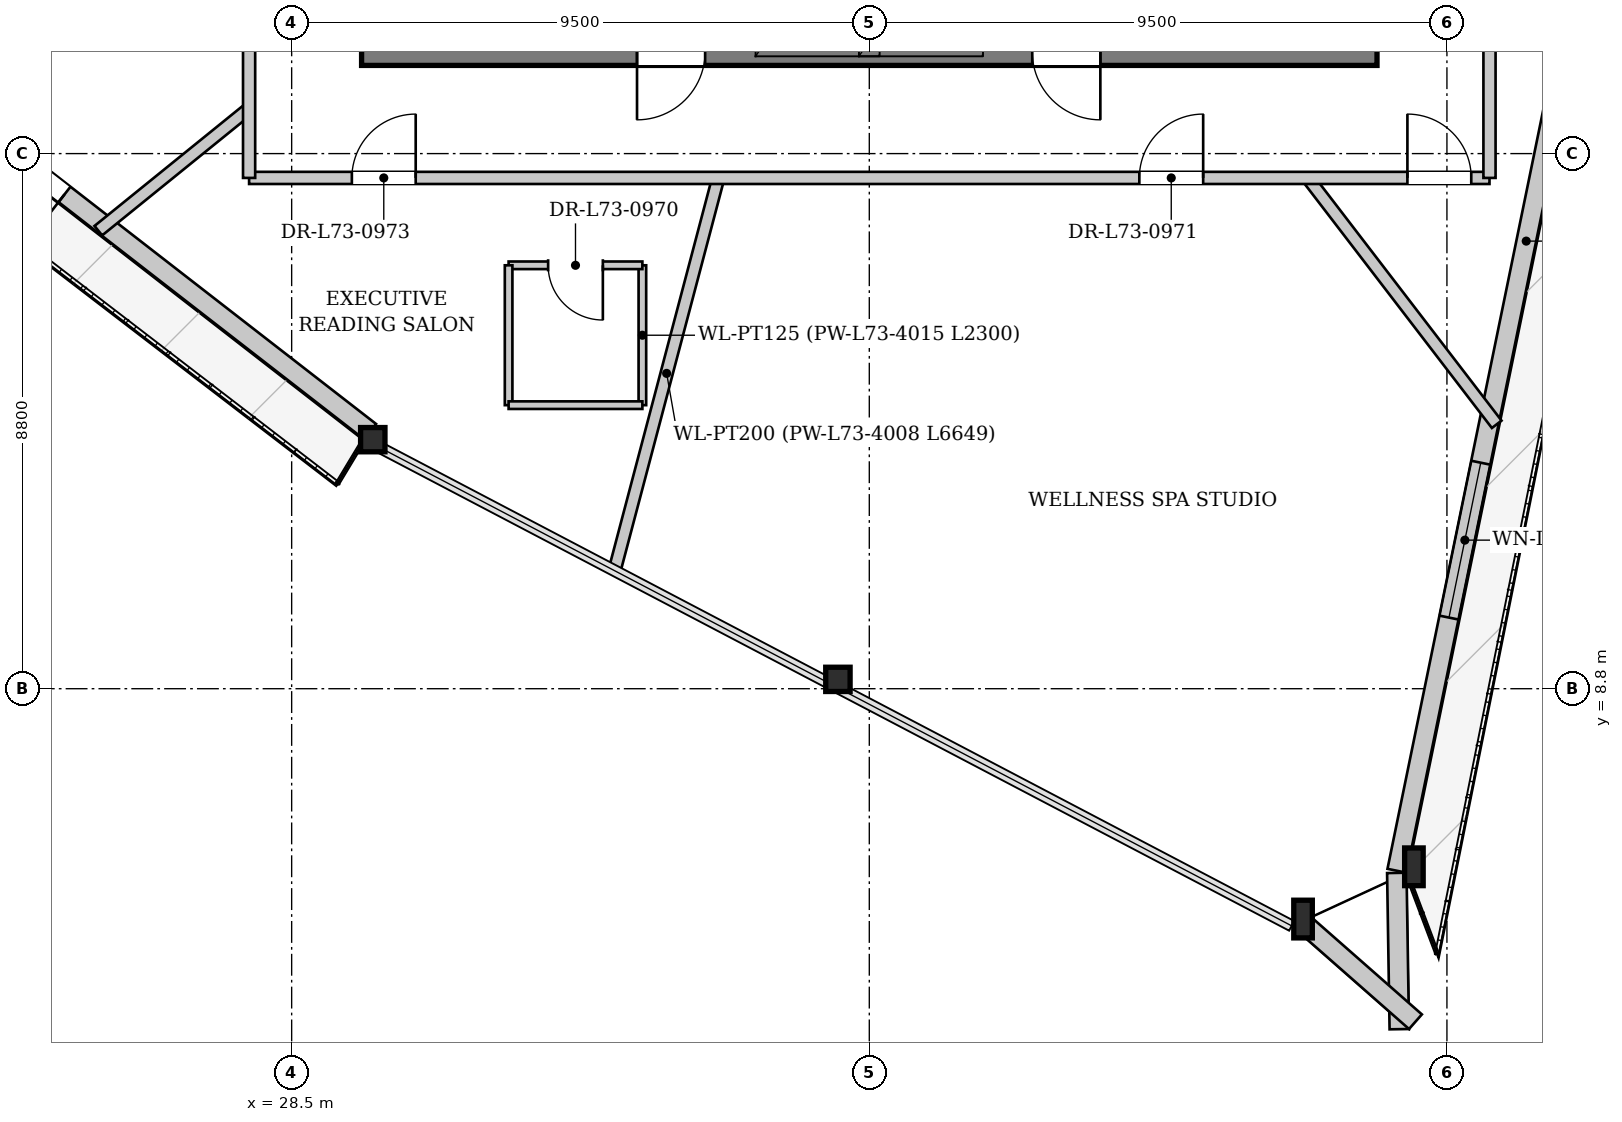
"""IFC4 building model, lengths in metres.
Left out: names, types, materials, properties, quantities, classifications, styles, units other than length and angle.
Written with IfcOpenShell. Run it as: python <this file> out.ifc"""

import sys

from ifc_helpers import new_model, si_unit, direction, frame, frame_2d, origin, origin_2d, place, context, subcontext, project, spatial, rectangle, i_section, extrude, source, transform, mapped, element, fill, save


model = new_model("IFC4")
c1 = context("Model", 3, precision=1e-05, world=origin(), true_north=direction((0.0, 1.0)))
c2 = subcontext(c1, "Body", "Model", "MODEL_VIEW")
j1 = project(units=[si_unit("LENGTHUNIT", "METRE"), si_unit("PLANEANGLEUNIT", "RADIAN")], contexts=[c1])
p1 = place(None, origin())
s1 = spatial("IfcSite", under=j1, at=p1, CompositionType="ELEMENT")
p2 = place(p1, origin())
s2 = spatial("IfcBuilding", under=s1, at=p2, CompositionType="ELEMENT")
p3 = place(p2, frame((0.0, 0.0, 274.1)))
s3 = spatial("IfcBuildingStorey", under=s2, at=p3, CompositionType="ELEMENT", Elevation=274.1)
m1 = source(origin(), c2, "Body", "SweptSolid", [
    extrude(i_section(OverallWidth=0.401, OverallDepth=0.399, WebThickness=0.022, FlangeThickness=0.034, at=origin_2d()), origin(), (0.0, 0.0, 1.0), 3.447),
])
p4 = place(p3, frame((29.692, 12.902, 0.0), z_axis=(0.082663911936, -0.003541727161, 0.996571188542), x_axis=(0.042805630631, 0.999083418933, 0.0)))
e1 = element("IfcColumn", 1, at=p4, inside=s3, PredefinedType="COLUMN", context=c2, shape_type="MappedRepresentation", body=[
    mapped(m1, transform((0.0, 0.0, 0.0), x_axis=(1.0, 0.0, 0.0), y_axis=(0.0, 1.0, 0.0), z_axis=(0.0, 0.0, 1.0), scale=1.0)),
])
m2 = source(origin(), c2, "Body", "SweptSolid", [
    extrude(i_section(OverallWidth=0.401, OverallDepth=0.399, WebThickness=0.022, FlangeThickness=0.034, at=origin_2d()), origin(), (0.0, 0.0, 1.0), 3.452),
])
p5 = place(p3, frame((37.319, 8.901, 0.0), z_axis=(0.095472332547, 0.030551146415, 0.994963145634), x_axis=(-0.304775727104, 0.952424147199, 0.0)))
e2 = element("IfcColumn", 2, at=p5, inside=s3, PredefinedType="COLUMN", context=c2, shape_type="MappedRepresentation", body=[
    mapped(m2, transform((0.0, 0.0, 0.0), x_axis=(1.0, 0.0, 0.0), y_axis=(0.0, 1.0, 0.0), z_axis=(0.0, 0.0, 1.0), scale=1.0)),
])
m3 = source(origin(), c2, "Body", "SweptSolid", [
    extrude(i_section(OverallWidth=0.305, OverallDepth=0.62, WebThickness=0.021, FlangeThickness=0.04, at=origin_2d()), origin(), (0.0, 0.0, 1.0), 3.462),
])
p6 = place(p3, frame((44.946, 4.9, 0.0), z_axis=(0.108166795995, 0.064378282101, 0.992046057922), x_axis=(-0.511444466069, 0.859316331817, 0.0)))
e3 = element("IfcColumn", 3, at=p6, inside=s3, PredefinedType="COLUMN", context=c2, shape_type="MappedRepresentation", body=[
    mapped(m3, transform((0.0, 0.0, 0.0), x_axis=(1.0, 0.0, 0.0), y_axis=(0.0, 1.0, 0.0), z_axis=(0.0, 0.0, 1.0), scale=1.0)),
])
m4 = source(origin(), c2, "Body", "SweptSolid", [
    extrude(i_section(OverallWidth=0.305, OverallDepth=0.62, WebThickness=0.021, FlangeThickness=0.04, at=origin_2d()), origin(), (0.0, 0.0, 1.0), 3.449),
])
p7 = place(p3, frame((46.836, 5.773, 0.0), z_axis=(0.070221852899, 0.05670131469, 0.99591859722), x_axis=(-0.628227565106, 0.778029643677, 0.0)))
e4 = element("IfcColumn", 4, at=p7, inside=s3, PredefinedType="COLUMN", context=c2, shape_type="MappedRepresentation", body=[
    mapped(m4, transform((0.0, 0.0, 0.0), x_axis=(1.0, 0.0, 0.0), y_axis=(0.0, 1.0, 0.0), z_axis=(0.0, 0.0, 1.0), scale=1.0)),
])
p8 = place(p3, frame((51.126, 27.473, 0.0), z_axis=(0.0, 0.0, 1.0), x_axis=(-0.201040285464, -0.979582974342, 0.0)))
e5 = element("IfcWall", 5, at=p8, inside=s3, PredefinedType="SOLIDWALL", context=c2, shape_type="SweptSolid", body=[
    extrude(rectangle(XDim=22.119, YDim=0.32, at=frame_2d((11.06, 0.0))), origin(), (0.0, 0.0, 1.0), 2.812),
])
p9 = place(p8, frame((6.328, 0.0, 0.0)))
e6 = element("IfcOpeningElement", 6, at=p9, cuts=e5, PredefinedType="OPENING", context=c2, shape_type="SweptSolid", body=[
    extrude(rectangle(XDim=1.5, YDim=2.3, at=frame_2d((0.75, 1.15))), frame((0.0, 0.17, 0.0), z_axis=(0.0, -1.0, 0.0), x_axis=(1.0, 0.0, 0.0)), (0.0, 0.0, 1.0), 0.34),
])
p10 = place(p8, frame((15.268, 0.0, 0.342)))
e7 = element("IfcOpeningElement", 7, at=p10, cuts=e5, PredefinedType="OPENING", context=c2, shape_type="SweptSolid", body=[
    extrude(rectangle(XDim=2.6, YDim=2.35, at=frame_2d((1.3, 1.175))), frame((0.0, 0.17, 0.0), z_axis=(0.0, -1.0, 0.0), x_axis=(1.0, 0.0, 0.0)), (0.0, 0.0, 1.0), 0.34),
])
for number, where, z_axis, x_axis in (
    (8, (46.676, 5.771, 0.0), (0.0, 0.0, 1.0), (0.016, -1.0, 0.0)),
    (9, (46.982, 3.324, 0.0), (0.0, 0.0, 1.0), (-0.751, 0.66, 0.0)),
):
    element("IfcWall", number, at=place(p3, frame(where, z_axis=z_axis, x_axis=x_axis)), inside=s3, PredefinedType="SOLIDWALL", context=c2, shape_type="SweptSolid", body=[
        extrude(rectangle(XDim=2.57, YDim=0.32, at=frame_2d((1.285, 0.0))), origin(), (0.0, 0.0, 1.0), 2.812),
    ])
p11 = place(p3, frame((29.79, 13.028, 0.0), z_axis=(0.0, 0.0, 1.0), x_axis=(-0.78993873284, 0.613185778014, 0.0)))
e10 = element("IfcWall", 10, at=p11, inside=s3, PredefinedType="SOLIDWALL", context=c2, shape_type="SweptSolid", body=[
    extrude(rectangle(XDim=17.226, YDim=0.32, at=frame_2d((8.613, 0.0))), origin(), (0.0, 0.0, 1.0), 2.812),
])
p12 = place(p11, frame((6.362, 0.0, 0.0)))
e11 = element("IfcOpeningElement", 11, at=p12, cuts=e10, PredefinedType="OPENING", context=c2, shape_type="SweptSolid", body=[
    extrude(rectangle(XDim=1.5, YDim=2.3, at=frame_2d((0.75, 1.15))), frame((0.0, 0.17, 0.0), z_axis=(0.0, -1.0, 0.0), x_axis=(1.0, 0.0, 0.0)), (0.0, 0.0, 1.0), 0.34),
])
p13 = place(p11, frame((11.447, 0.0, 0.342)))
e12 = element("IfcOpeningElement", 12, at=p13, cuts=e10, PredefinedType="OPENING", context=c2, shape_type="SweptSolid", body=[
    extrude(rectangle(XDim=2.6, YDim=2.35, at=frame_2d((1.3, 1.175))), frame((0.0, 0.17, 0.0), z_axis=(0.0, -1.0, 0.0), x_axis=(1.0, 0.0, 0.0)), (0.0, 0.0, 1.0), 0.34),
])
p14 = place(p3, frame((46.35, 19.275, 0.0), z_axis=(0.0, 0.0, 1.0), x_axis=(-1.0, 0.0, 0.0)))
e13 = element("IfcWall", 13, at=p14, inside=s3, PredefinedType="SHEAR", context=c2, shape_type="SweptSolid", body=[
    extrude(rectangle(XDim=16.7, YDim=0.45, at=frame_2d((8.35, 0.0))), origin(), (0.0, 0.0, 1.0), 3.32),
])
p15 = place(p14, frame((4.55, 0.0, 0.0)))
e14 = element("IfcOpeningElement", 14, at=p15, cuts=e13, PredefinedType="OPENING", context=c2, shape_type="SweptSolid", body=[
    extrude(rectangle(XDim=1.12, YDim=2.25, at=frame_2d((0.56, 1.125))), frame((0.0, 0.235, 0.0), z_axis=(0.0, -1.0, 0.0), x_axis=(1.0, 0.0, 0.0)), (0.0, 0.0, 1.0), 0.47),
])
p16 = place(p14, frame((11.05, 0.0, 0.0)))
e15 = element("IfcOpeningElement", 15, at=p16, cuts=e13, PredefinedType="OPENING", context=c2, shape_type="SweptSolid", body=[
    extrude(rectangle(XDim=1.12, YDim=2.25, at=frame_2d((0.56, 1.125))), frame((0.0, 0.235, 0.0), z_axis=(0.0, -1.0, 0.0), x_axis=(1.0, 0.0, 0.0)), (0.0, 0.0, 1.0), 0.47),
])
p17 = place(p3, frame((35.516, 17.2, 0.0), z_axis=(0.0, 0.0, 1.0), x_axis=(-0.255438396105, -0.966825333654, 0.0)))
e16 = element("IfcWall", 16, at=p17, inside=s3, PredefinedType="PARTITIONING", context=c2, shape_type="SweptSolid", body=[
    extrude(rectangle(XDim=6.649, YDim=0.2, at=frame_2d((3.325, 0.0))), origin(), (0.0, 0.0, 1.0), 3.32),
])
p18 = place(p3, frame((45.21, 17.2, 0.0), z_axis=(0.0, 0.0, 1.0), x_axis=(0.608631250034, -0.793453213165, 0.0)))
e17 = element("IfcWall", 17, at=p18, inside=s3, PredefinedType="PARTITIONING", context=c2, shape_type="SweptSolid", body=[
    extrude(rectangle(XDim=5.107, YDim=0.2, at=frame_2d((2.553, 0.0))), origin(), (0.0, 0.0, 1.0), 3.32),
])
p19 = place(p3, frame((27.8, 18.341, 0.0), z_axis=(0.0, 0.0, 1.0), x_axis=(-0.777145079271, -0.629321480457, 0.0)))
e18 = element("IfcWall", 18, at=p19, inside=s3, PredefinedType="PARTITIONING", context=c2, shape_type="SweptSolid", body=[
    extrude(rectangle(XDim=3.191, YDim=0.2, at=frame_2d((1.595, 0.0))), origin(), (0.0, 0.0, 1.0), 3.32),
])
p20 = place(p3, frame((34.268, 13.463, 0.0), z_axis=(0.0, 0.0, 1.0), x_axis=(0.0, 1.0, 0.0)))
e19 = element("IfcWall", 19, at=p20, inside=s3, PredefinedType="PARTITIONING", context=c2, shape_type="SweptSolid", body=[
    extrude(rectangle(XDim=2.3, YDim=0.125, at=frame_2d((1.15, 0.0))), origin(), (0.0, 0.0, 1.0), 3.32),
])
p21 = place(p3, frame((34.268, 15.763, 0.0), z_axis=(0.0, 0.0, 1.0), x_axis=(-1.0, 0.0, 0.0)))
e20 = element("IfcWall", 20, at=p21, inside=s3, PredefinedType="PARTITIONING", context=c2, shape_type="SweptSolid", body=[
    extrude(rectangle(XDim=2.2, YDim=0.125, at=frame_2d((1.1, 0.0))), origin(), (0.0, 0.0, 1.0), 3.32),
])
p22 = place(p21, frame((0.65, 0.0, 0.0)))
e21 = element("IfcOpeningElement", 21, at=p22, cuts=e20, PredefinedType="OPENING", context=c2, shape_type="SweptSolid", body=[
    extrude(rectangle(XDim=0.9, YDim=2.1, at=frame_2d((0.45, 1.05))), frame((0.0, 0.073, 0.0), z_axis=(0.0, -1.0, 0.0), x_axis=(1.0, 0.0, 0.0)), (0.0, 0.0, 1.0), 0.145),
])
p23 = place(p3, frame((32.068, 15.763, 0.0), z_axis=(0.0, 0.0, 1.0), x_axis=(0.0, -1.0, 0.0)))
e22 = element("IfcWall", 22, at=p23, inside=s3, PredefinedType="PARTITIONING", context=c2, shape_type="SweptSolid", body=[
    extrude(rectangle(XDim=2.3, YDim=0.125, at=frame_2d((1.15, 0.0))), origin(), (0.0, 0.0, 1.0), 3.32),
])
p24 = place(p3, frame((32.068, 13.463, 0.0), z_axis=(0.0, 0.0, 1.0), x_axis=(1.0, 0.0, 0.0)))
e23 = element("IfcWall", 23, at=p24, inside=s3, PredefinedType="PARTITIONING", context=c2, shape_type="SweptSolid", body=[
    extrude(rectangle(XDim=2.2, YDim=0.125, at=frame_2d((1.1, 0.0))), origin(), (0.0, 0.0, 1.0), 3.32),
])
p25 = place(p3, frame((27.8, 17.2, 0.0), z_axis=(0.0, 0.0, 1.0), x_axis=(1.0, 0.0, 0.0)))
e24 = element("IfcWall", 24, at=p25, inside=s3, PredefinedType="PARTITIONING", context=c2, shape_type="SweptSolid", body=[
    extrude(rectangle(XDim=20.4, YDim=0.2, at=frame_2d((10.2, 0.0))), origin(), (0.0, 0.0, 1.0), 3.32),
])
p26 = place(p25, frame((14.641, 0.0, 0.0)))
e25 = element("IfcOpeningElement", 25, at=p26, cuts=e24, PredefinedType="OPENING", context=c2, shape_type="SweptSolid", body=[
    extrude(rectangle(XDim=1.05, YDim=2.2, at=frame_2d((0.525, 1.1))), frame((0.0, 0.11, 0.0), z_axis=(0.0, -1.0, 0.0), x_axis=(1.0, 0.0, 0.0)), (0.0, 0.0, 1.0), 0.22),
])
p27 = place(p25, frame((19.05, 0.0, 0.0)))
e26 = element("IfcOpeningElement", 26, at=p27, cuts=e24, PredefinedType="OPENING", context=c2, shape_type="SweptSolid", body=[
    extrude(rectangle(XDim=1.05, YDim=2.2, at=frame_2d((0.525, 1.1))), frame((0.0, 0.11, 0.0), z_axis=(0.0, -1.0, 0.0), x_axis=(1.0, 0.0, 0.0)), (0.0, 0.0, 1.0), 0.22),
])
p28 = place(p25, frame((1.69, 0.0, 0.0)))
e27 = element("IfcOpeningElement", 27, at=p28, cuts=e24, PredefinedType="OPENING", context=c2, shape_type="SweptSolid", body=[
    extrude(rectangle(XDim=1.05, YDim=2.2, at=frame_2d((0.525, 1.1))), frame((0.0, 0.11, 0.0), z_axis=(0.0, -1.0, 0.0), x_axis=(1.0, 0.0, 0.0)), (0.0, 0.0, 1.0), 0.22),
])
p29 = place(p3, frame((27.8, 17.2, 0.0), z_axis=(0.0, 0.0, 1.0), x_axis=(0.0, 1.0, 0.0)))
e28 = element("IfcWall", 28, at=p29, inside=s3, PredefinedType="PARTITIONING", context=c2, shape_type="SweptSolid", body=[
    extrude(rectangle(XDim=17.904, YDim=0.2, at=frame_2d((8.952, 0.0))), origin(), (0.0, 0.0, 1.0), 3.32),
])
p30 = place(p29, frame((6.824, 0.0, 0.0)))
e29 = element("IfcOpeningElement", 29, at=p30, cuts=e28, PredefinedType="OPENING", context=c2, shape_type="SweptSolid", body=[
    extrude(rectangle(XDim=1.05, YDim=2.2, at=frame_2d((0.525, 1.1))), frame((0.0, 0.11, 0.0), z_axis=(0.0, -1.0, 0.0), x_axis=(1.0, 0.0, 0.0)), (0.0, 0.0, 1.0), 0.22),
])
p31 = place(p3, frame((48.2, 17.2, 0.0), z_axis=(0.0, 0.0, 1.0), x_axis=(0.0, 1.0, 0.0)))
e30 = element("IfcWall", 30, at=p31, inside=s3, PredefinedType="PARTITIONING", context=c2, shape_type="SweptSolid", body=[
    extrude(rectangle(XDim=18.8, YDim=0.2, at=frame_2d((9.4, 0.0))), origin(), (0.0, 0.0, 1.0), 2.945),
])
m5 = source(origin(), c2, "Body", "SweptSolid", [
    extrude(rectangle(XDim=2.6, YDim=2.35, at=frame_2d((1.3, 1.175))), frame((0.0, 0.03, 0.0), z_axis=(0.0, -1.0, 0.0), x_axis=(1.0, 0.0, 0.0)), (0.0, 0.0, 1.0), 0.06),
])
p32 = place(p10, origin())
e31 = element("IfcWindow", 31, at=p32, inside=s3, PartitioningType="SINGLE_PANEL", PredefinedType="WINDOW", context=c2, shape_type="MappedRepresentation", body=[
    mapped(m5, transform((0.0, 0.0, 0.0), x_axis=(1.0, 0.0, 0.0), y_axis=(0.0, 1.0, 0.0), z_axis=(0.0, 0.0, 1.0), scale=1.0)),
])
fill(e7, e31)
m6 = source(origin(), c2, "Body", "SweptSolid", [
    extrude(rectangle(XDim=1.5, YDim=2.3, at=frame_2d((0.75, 1.15))), frame((0.0, 0.025, 0.0), z_axis=(0.0, -1.0, 0.0), x_axis=(1.0, 0.0, 0.0)), (0.0, 0.0, 1.0), 0.05),
])
p33 = place(p12, origin())
e32 = element("IfcDoor", 32, at=p33, inside=s3, OperationType="DOUBLE_DOOR_SINGLE_SWING", PredefinedType="DOOR", context=c2, shape_type="MappedRepresentation", body=[
    mapped(m6, transform((0.0, 0.0, 0.0), x_axis=(1.0, 0.0, 0.0), y_axis=(0.0, 1.0, 0.0), z_axis=(0.0, 0.0, 1.0), scale=1.0)),
])
fill(e11, e32)
m7 = source(origin(), c2, "Body", "SweptSolid", [
    extrude(rectangle(XDim=1.12, YDim=2.25, at=frame_2d((0.56, 1.125))), frame((0.0, 0.025, 0.0), z_axis=(0.0, -1.0, 0.0), x_axis=(1.0, 0.0, 0.0)), (0.0, 0.0, 1.0), 0.05),
])
p34 = place(p15, origin())
e33 = element("IfcDoor", 33, at=p34, inside=s3, OperationType="SINGLE_SWING_LEFT", PredefinedType="DOOR", context=c2, shape_type="MappedRepresentation", body=[
    mapped(m7, transform((0.0, 0.0, 0.0), x_axis=(1.0, 0.0, 0.0), y_axis=(0.0, 1.0, 0.0), z_axis=(0.0, 0.0, 1.0), scale=1.0)),
])
fill(e14, e33)
p35 = place(p16, origin())
e34 = element("IfcDoor", 34, at=p35, inside=s3, OperationType="SINGLE_SWING_RIGHT", PredefinedType="DOOR", context=c2, shape_type="MappedRepresentation", body=[
    mapped(m7, transform((0.0, 0.0, 0.0), x_axis=(1.0, 0.0, 0.0), y_axis=(0.0, 1.0, 0.0), z_axis=(0.0, 0.0, 1.0), scale=1.0)),
])
fill(e15, e34)
m8 = source(origin(), c2, "Body", "SweptSolid", [
    extrude(rectangle(XDim=0.9, YDim=2.1, at=frame_2d((0.45, 1.05))), frame((0.0, 0.025, 0.0), z_axis=(0.0, -1.0, 0.0), x_axis=(1.0, 0.0, 0.0)), (0.0, 0.0, 1.0), 0.05),
])
p36 = place(p22, origin())
e35 = element("IfcDoor", 35, at=p36, inside=s3, OperationType="SINGLE_SWING_LEFT", PredefinedType="DOOR", context=c2, shape_type="MappedRepresentation", body=[
    mapped(m8, transform((0.0, 0.0, 0.0), x_axis=(1.0, 0.0, 0.0), y_axis=(0.0, 1.0, 0.0), z_axis=(0.0, 0.0, 1.0), scale=1.0)),
])
fill(e21, e35)
m9 = source(origin(), c2, "Body", "SweptSolid", [
    extrude(rectangle(XDim=1.05, YDim=2.2, at=frame_2d((0.525, 1.1))), frame((0.0, 0.025, 0.0), z_axis=(0.0, -1.0, 0.0), x_axis=(1.0, 0.0, 0.0)), (0.0, 0.0, 1.0), 0.05),
])
p37 = place(p26, origin())
e36 = element("IfcDoor", 36, at=p37, inside=s3, OperationType="SINGLE_SWING_RIGHT", PredefinedType="DOOR", context=c2, shape_type="MappedRepresentation", body=[
    mapped(m9, transform((0.0, 0.0, 0.0), x_axis=(1.0, 0.0, 0.0), y_axis=(0.0, 1.0, 0.0), z_axis=(0.0, 0.0, 1.0), scale=1.0)),
])
fill(e25, e36)
p38 = place(p27, origin())
e37 = element("IfcDoor", 37, at=p38, inside=s3, OperationType="SINGLE_SWING_LEFT", PredefinedType="DOOR", context=c2, shape_type="MappedRepresentation", body=[
    mapped(m9, transform((0.0, 0.0, 0.0), x_axis=(1.0, 0.0, 0.0), y_axis=(0.0, 1.0, 0.0), z_axis=(0.0, 0.0, 1.0), scale=1.0)),
])
fill(e26, e37)
p39 = place(p28, origin())
e38 = element("IfcDoor", 38, at=p39, inside=s3, OperationType="SINGLE_SWING_RIGHT", PredefinedType="DOOR", context=c2, shape_type="MappedRepresentation", body=[
    mapped(m9, transform((0.0, 0.0, 0.0), x_axis=(1.0, 0.0, 0.0), y_axis=(0.0, 1.0, 0.0), z_axis=(0.0, 0.0, 1.0), scale=1.0)),
])
fill(e27, e38)
save(model, sys.argv[1])
